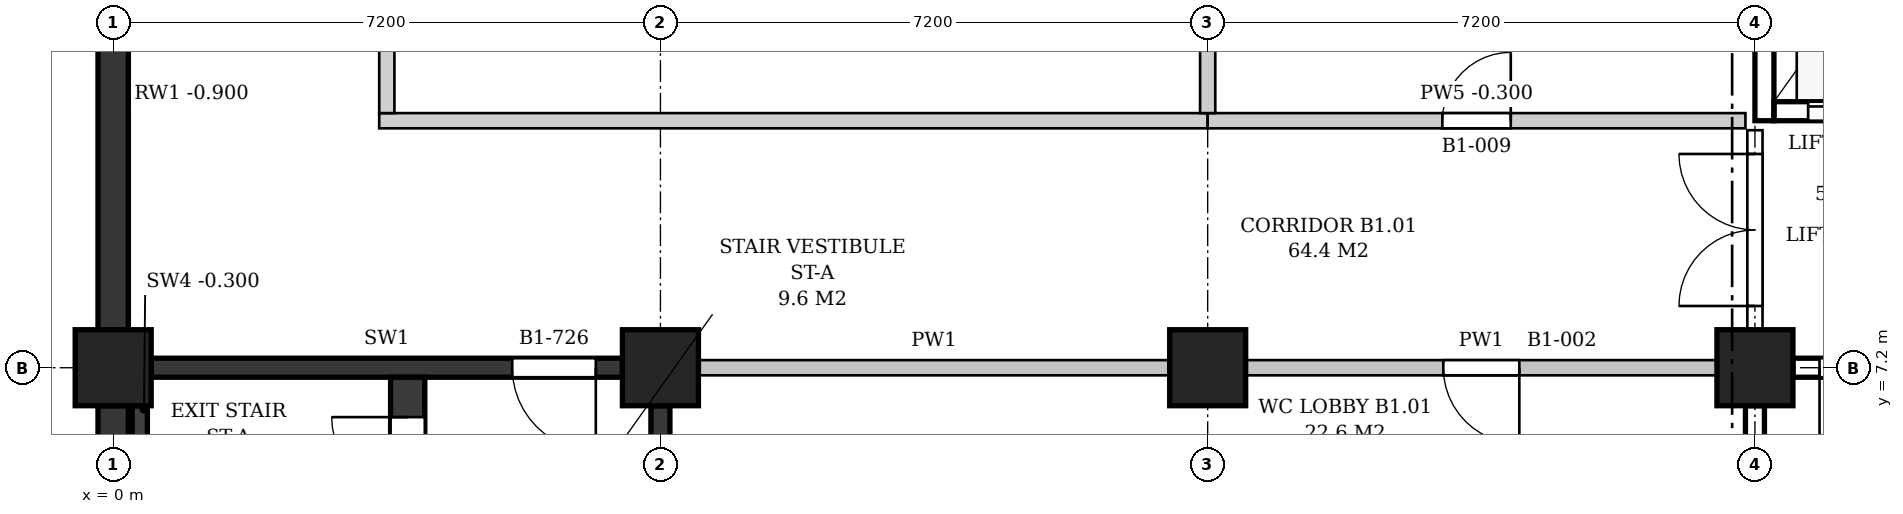
"""IFC4 building model, lengths in metres.
Left out: names, types, materials, properties, quantities, classifications, styles, units other than length and angle.
Written with IfcOpenShell. Run it as: python <this file> out.ifc"""

import sys

from ifc_helpers import new_model, si_unit, direction, frame, frame_2d, origin, origin_2d, place, context, subcontext, project, spatial, polyline, rectangle, outline, extrude, element, fill, save


model = new_model("IFC4")
c1 = context("Model", 3, precision=1e-05, world=origin(), true_north=direction((0.0, 1.0)))
c2 = subcontext(c1, "Body", "Model", "MODEL_VIEW")
j1 = project(units=[si_unit("LENGTHUNIT", "METRE"), si_unit("PLANEANGLEUNIT", "RADIAN")], contexts=[c1])
p1 = place(None, origin())
s1 = spatial("IfcSite", under=j1, at=p1, CompositionType="ELEMENT")
p2 = place(p1, origin())
s2 = spatial("IfcBuilding", under=s1, at=p2, CompositionType="ELEMENT")
p3 = place(p2, frame((0.0, 0.0, -4.5)))
s3 = spatial("IfcBuildingStorey", under=s2, at=p3, CompositionType="ELEMENT", Elevation=-4.5)
for number, where, z_axis, x_axis in (
    (1, (0.0, 7.2, 0.0), (0.0, 0.0, 1.0), (1.0, 0.0, 0.0)),
    (2, (7.2, 7.2, 0.0), (0.0, 0.0, 1.0), (1.0, 0.0, 0.0)),
    (3, (14.4, 7.2, 0.0), (0.0, 0.0, 1.0), (1.0, 0.0, 0.0)),
    (4, (21.6, 7.2, 0.0), (0.0, 0.0, 1.0), (1.0, 0.0, 0.0)),
):
    element("IfcColumn", number, at=place(p3, frame(where, z_axis=z_axis, x_axis=x_axis)), inside=s3, PredefinedType="COLUMN", context=c2, shape_type="SweptSolid", body=[
        extrude(rectangle(XDim=1.0, YDim=1.0, at=origin_2d()), origin(), (0.0, 0.0, 1.0), 4.5),
    ])
for number, where, z_axis, x_axis in (
    (5, (0.0, 13.9, 0.0), (0.0, 0.0, 1.0), (0.0, -1.0, 0.0)),
    (6, (0.0, 6.7, 0.0), (0.0, 0.0, 1.0), (0.0, -1.0, 0.0)),
):
    element("IfcWall", number, at=place(p3, frame(where, z_axis=z_axis, x_axis=x_axis)), inside=s3, PredefinedType="SOLIDWALL", context=c2, shape_type="SweptSolid", body=[
        extrude(rectangle(XDim=6.2, YDim=0.4, at=frame_2d((3.1, 0.0))), origin(), (0.0, 0.0, 1.0), 3.6),
    ])
p4 = place(p3, frame((0.5, 7.2, 0.0), z_axis=(0.0, 0.0, 1.0), x_axis=(1.0, 0.0, 0.0)))
e7 = element("IfcWall", 7, at=p4, inside=s3, PredefinedType="SHEAR", context=c2, shape_type="SweptSolid", body=[
    extrude(rectangle(XDim=6.2, YDim=0.25, at=frame_2d((3.1, 0.0))), origin(), (0.0, 0.0, 1.0), 3.4),
])
p5 = place(p4, frame((4.75, 0.0, 0.0)))
e8 = element("IfcOpeningElement", 8, at=p5, cuts=e7, PredefinedType="OPENING", context=c2, shape_type="SweptSolid", body=[
    extrude(rectangle(XDim=1.1, YDim=2.1, at=frame_2d((0.55, 1.05))), frame((0.0, 0.135, 0.0), z_axis=(0.0, -1.0, 0.0), x_axis=(1.0, 0.0, 0.0)), (0.0, 0.0, 1.0), 0.27),
])
p6 = place(p3, frame((7.2, 0.5, 0.0), z_axis=(0.0, 0.0, 1.0), x_axis=(0.0, 1.0, 0.0)))
e9 = element("IfcWall", 9, at=p6, inside=s3, PredefinedType="SHEAR", context=c2, shape_type="SweptSolid", body=[
    extrude(rectangle(XDim=6.2, YDim=0.25, at=frame_2d((3.1, 0.0))), origin(), (0.0, 0.0, 1.0), 3.4),
])
p7 = place(p3, frame((0.35, 0.5, 0.0), z_axis=(0.0, 0.0, 1.0), x_axis=(0.0, 1.0, 0.0)))
e10 = element("IfcWall", 10, at=p7, inside=s3, PredefinedType="SHEAR", context=c2, shape_type="SweptSolid", body=[
    extrude(rectangle(XDim=6.2, YDim=0.2, at=frame_2d((3.1, 0.0))), origin(), (0.0, 0.0, 1.0), 4.2),
])
p8 = place(p3, frame((3.875, 0.2, 0.0), z_axis=(0.0, 0.0, 1.0), x_axis=(0.0, 1.0, 0.0)))
e11 = element("IfcWall", 11, at=p8, inside=s3, PredefinedType="SHEAR", context=c2, shape_type="SweptSolid", body=[
    extrude(rectangle(XDim=6.875, YDim=0.45, at=frame_2d((3.438, 0.0))), origin(), (0.0, 0.0, 1.0), 4.2),
])
p9 = place(p8, frame((5.35, 0.0, 0.0)))
e12 = element("IfcOpeningElement", 12, at=p9, cuts=e11, PredefinedType="OPENING", context=c2, shape_type="SweptSolid", body=[
    extrude(rectangle(XDim=1.0, YDim=2.1, at=frame_2d((0.5, 1.05))), frame((0.0, 0.235, 0.0), z_axis=(0.0, -1.0, 0.0), x_axis=(1.0, 0.0, 0.0)), (0.0, 0.0, 1.0), 0.47),
])
p10 = place(p3, frame((22.1, 7.2, 0.0), z_axis=(0.0, 0.0, 1.0), x_axis=(1.0, 0.0, 0.0)))
e13 = element("IfcWall", 13, at=p10, inside=s3, PredefinedType="SHEAR", context=c2, shape_type="SweptSolid", body=[
    extrude(rectangle(XDim=6.2, YDim=0.25, at=frame_2d((3.1, 0.0))), origin(), (0.0, 0.0, 1.0), 3.4),
])
p11 = place(p10, frame((0.35, 0.0, 0.0)))
e14 = element("IfcOpeningElement", 14, at=p11, cuts=e13, PredefinedType="OPENING", context=c2, shape_type="SweptSolid", body=[
    extrude(rectangle(XDim=1.1, YDim=2.1, at=frame_2d((0.55, 1.05))), frame((0.0, 0.135, 0.0), z_axis=(0.0, -1.0, 0.0), x_axis=(1.0, 0.0, 0.0)), (0.0, 0.0, 1.0), 0.27),
])
p12 = place(p3, frame((21.6, 0.5, 0.0), z_axis=(0.0, 0.0, 1.0), x_axis=(0.0, 1.0, 0.0)))
e15 = element("IfcWall", 15, at=p12, inside=s3, PredefinedType="SHEAR", context=c2, shape_type="SweptSolid", body=[
    extrude(rectangle(XDim=6.2, YDim=0.25, at=frame_2d((3.1, 0.0))), origin(), (0.0, 0.0, 1.0), 3.4),
])
p13 = place(p3, frame((21.725, 10.45, -1.6), z_axis=(0.0, 0.0, 1.0), x_axis=(0.0, 1.0, 0.0)))
e16 = element("IfcWall", 16, at=p13, inside=s3, PredefinedType="SHEAR", context=c2, shape_type="SweptSolid", body=[
    extrude(rectangle(XDim=3.45, YDim=0.25, at=frame_2d((1.725, 0.0))), origin(), (0.0, 0.0, 1.0), 5.0),
])
p14 = place(p3, frame((21.85, 10.575, 0.0), z_axis=(0.0, 0.0, 1.0), x_axis=(1.0, 0.0, 0.0)))
e17 = element("IfcWall", 17, at=p14, inside=s3, PredefinedType="SHEAR", context=c2, shape_type="SweptSolid", body=[
    extrude(rectangle(XDim=2.0, YDim=0.25, at=frame_2d((1.0, 0.0))), origin(), (0.0, 0.0, 1.0), 4.2),
])
p15 = place(p14, frame((0.45, 0.0, 0.0)))
e18 = element("IfcOpeningElement", 18, at=p15, cuts=e17, PredefinedType="OPENING", context=c2, shape_type="SweptSolid", body=[
    extrude(rectangle(XDim=1.1, YDim=2.1, at=frame_2d((0.55, 1.05))), frame((0.0, 0.135, 0.0), z_axis=(0.0, -1.0, 0.0), x_axis=(1.0, 0.0, 0.0)), (0.0, 0.0, 1.0), 0.27),
])
p16 = place(p3, frame((7.7, 7.2, 0.0), z_axis=(0.0, 0.0, 1.0), x_axis=(1.0, 0.0, 0.0)))
e19 = element("IfcWall", 19, at=p16, inside=s3, PredefinedType="PARTITIONING", context=c2, shape_type="SweptSolid", body=[
    extrude(rectangle(XDim=6.2, YDim=0.2, at=frame_2d((3.1, 0.0))), origin(), (0.0, 0.0, 1.0), 3.4),
])
p17 = place(p3, frame((14.9, 7.2, 0.0), z_axis=(0.0, 0.0, 1.0), x_axis=(1.0, 0.0, 0.0)))
e20 = element("IfcWall", 20, at=p17, inside=s3, PredefinedType="PARTITIONING", context=c2, shape_type="SweptSolid", body=[
    extrude(rectangle(XDim=6.2, YDim=0.2, at=frame_2d((3.1, 0.0))), origin(), (0.0, 0.0, 1.0), 3.4),
])
p18 = place(p17, frame((2.6, 0.0, 0.0)))
e21 = element("IfcOpeningElement", 21, at=p18, cuts=e20, PredefinedType="OPENING", context=c2, shape_type="SweptSolid", body=[
    extrude(rectangle(XDim=1.0, YDim=2.1, at=frame_2d((0.5, 1.05))), frame((0.0, 0.11, 0.0), z_axis=(0.0, -1.0, 0.0), x_axis=(1.0, 0.0, 0.0)), (0.0, 0.0, 1.0), 0.22),
])
p19 = place(p3, frame((3.5, 10.45, 0.0), z_axis=(0.0, 0.0, 1.0), x_axis=(1.0, 0.0, 0.0)))
e22 = element("IfcWall", 22, at=p19, inside=s3, PredefinedType="PARTITIONING", context=c2, shape_type="SweptSolid", body=[
    extrude(outline(polyline([(0.0, 0.0), (10.9, 0.0), (10.9, 3.4), (10.6, 3.4), (10.6, 4.2), (4.0, 4.2), (4.0, 3.4), (3.4, 3.4), (3.4, 4.2), (0.0, 4.2), (0.0, 0.0)])), frame((0.0, 0.1, 0.0), z_axis=(0.0, -1.0, 0.0), x_axis=(1.0, 0.0, 0.0)), (0.0, 0.0, 1.0), 0.2),
])
p20 = place(p3, frame((14.4, 10.45, 0.0), z_axis=(0.0, 0.0, 1.0), x_axis=(1.0, 0.0, 0.0)))
e23 = element("IfcWall", 23, at=p20, inside=s3, PredefinedType="SOLIDWALL", context=c2, shape_type="SweptSolid", body=[
    extrude(outline(polyline([(0.0, 0.0), (7.075, 0.0), (7.075, 3.4), (6.9, 3.4), (6.9, 4.2), (0.3, 4.2), (0.3, 3.4), (0.0, 3.4), (0.0, 0.0)])), frame((0.0, 0.1, 0.0), z_axis=(0.0, -1.0, 0.0), x_axis=(1.0, 0.0, 0.0)), (0.0, 0.0, 1.0), 0.2),
])
p21 = place(p20, frame((3.088, 0.0, 0.0)))
e24 = element("IfcOpeningElement", 24, at=p21, cuts=e23, PredefinedType="OPENING", context=c2, shape_type="SweptSolid", body=[
    extrude(rectangle(XDim=0.9, YDim=2.1, at=frame_2d((0.45, 1.05))), frame((0.0, 0.11, 0.0), z_axis=(0.0, -1.0, 0.0), x_axis=(1.0, 0.0, 0.0)), (0.0, 0.0, 1.0), 0.22),
])
p22 = place(p3, frame((3.6, 10.55, 0.0), z_axis=(0.0, 0.0, 1.0), x_axis=(0.0, 1.0, 0.0)))
e25 = element("IfcWall", 25, at=p22, inside=s3, PredefinedType="PARTITIONING", context=c2, shape_type="SweptSolid", body=[
    extrude(outline(polyline([(0.0, 0.0), (18.15, 0.0), (18.15, 3.4), (17.95, 3.4), (17.95, 4.2), (11.35, 4.2), (11.35, 3.4), (10.75, 3.4), (10.75, 4.2), (4.15, 4.2), (4.15, 3.4), (3.55, 3.4), (3.55, 4.2), (0.0, 4.2), (0.0, 0.0)])), frame((0.0, 0.1, 0.0), z_axis=(0.0, -1.0, 0.0), x_axis=(1.0, 0.0, 0.0)), (0.0, 0.0, 1.0), 0.2),
])
p23 = place(p22, frame((8.075, 0.0, 0.0)))
e26 = element("IfcOpeningElement", 26, at=p23, cuts=e25, PredefinedType="OPENING", context=c2, shape_type="SweptSolid", body=[
    extrude(rectangle(XDim=2.0, YDim=2.1, at=frame_2d((1.0, 1.05))), frame((0.0, 0.11, 0.0), z_axis=(0.0, -1.0, 0.0), x_axis=(1.0, 0.0, 0.0)), (0.0, 0.0, 1.0), 0.22),
])
p24 = place(p22, frame((2.988, 0.0, 0.0)))
e27 = element("IfcOpeningElement", 27, at=p24, cuts=e25, PredefinedType="OPENING", context=c2, shape_type="SweptSolid", body=[
    extrude(rectangle(XDim=2.0, YDim=2.1, at=frame_2d((1.0, 1.05))), frame((0.0, 0.11, 0.0), z_axis=(0.0, -1.0, 0.0), x_axis=(1.0, 0.0, 0.0)), (0.0, 0.0, 1.0), 0.22),
])
p25 = place(p3, frame((14.4, 10.55, 0.0), z_axis=(0.0, 0.0, 1.0), x_axis=(0.0, 1.0, 0.0)))
e28 = element("IfcWall", 28, at=p25, inside=s3, PredefinedType="SOLIDWALL", context=c2, shape_type="SweptSolid", body=[
    extrude(rectangle(XDim=3.35, YDim=0.2, at=frame_2d((1.675, 0.0))), origin(), (0.0, 0.0, 1.0), 3.4),
])
p26 = place(p3, frame((21.6, 7.7, 0.0), z_axis=(0.0, 0.0, 1.0), x_axis=(0.0, 1.0, 0.0)))
e29 = element("IfcWall", 29, at=p26, inside=s3, PredefinedType="PARTITIONING", context=c2, shape_type="SweptSolid", body=[
    extrude(rectangle(XDim=2.625, YDim=0.2, at=frame_2d((1.312, 0.0))), origin(), (0.0, 0.0, 1.0), 3.4),
])
p27 = place(p26, frame((0.312, 0.0, 0.0)))
e30 = element("IfcOpeningElement", 30, at=p27, cuts=e29, PredefinedType="OPENING", context=c2, shape_type="SweptSolid", body=[
    extrude(rectangle(XDim=2.0, YDim=2.4, at=frame_2d((1.0, 1.2))), frame((0.0, 0.11, 0.0), z_axis=(0.0, -1.0, 0.0), x_axis=(1.0, 0.0, 0.0)), (0.0, 0.0, 1.0), 0.22),
])
p28 = place(p9, origin())
e31 = element("IfcDoor", 31, at=p28, inside=s3, OperationType="SINGLE_SWING_RIGHT", PredefinedType="DOOR", context=c2, shape_type="SweptSolid", body=[
    extrude(rectangle(XDim=1.0, YDim=2.1, at=frame_2d((0.5, 1.05))), frame((0.0, 0.025, 0.0), z_axis=(0.0, -1.0, 0.0), x_axis=(1.0, 0.0, 0.0)), (0.0, 0.0, 1.0), 0.05),
])
fill(e12, e31)
p29 = place(p5, frame((1.1, 0.0, 0.0), z_axis=(0.0, 0.0, 1.0), x_axis=(-1.0, 0.0, 0.0)))
e32 = element("IfcDoor", 32, at=p29, inside=s3, OperationType="SINGLE_SWING_LEFT", PredefinedType="DOOR", context=c2, shape_type="SweptSolid", body=[
    extrude(rectangle(XDim=1.1, YDim=2.1, at=frame_2d((0.55, 1.05))), frame((0.0, 0.025, 0.0), z_axis=(0.0, -1.0, 0.0), x_axis=(1.0, 0.0, 0.0)), (0.0, 0.0, 1.0), 0.05),
])
fill(e8, e32)
p30 = place(p11, frame((1.1, 0.0, 0.0), z_axis=(0.0, 0.0, 1.0), x_axis=(-1.0, 0.0, 0.0)))
e33 = element("IfcDoor", 33, at=p30, inside=s3, OperationType="SINGLE_SWING_RIGHT", PredefinedType="DOOR", context=c2, shape_type="SweptSolid", body=[
    extrude(rectangle(XDim=1.1, YDim=2.1, at=frame_2d((0.55, 1.05))), frame((0.0, 0.025, 0.0), z_axis=(0.0, -1.0, 0.0), x_axis=(1.0, 0.0, 0.0)), (0.0, 0.0, 1.0), 0.05),
])
fill(e14, e33)
p31 = place(p15, origin())
e34 = element("IfcDoor", 34, at=p31, inside=s3, OperationType="SLIDING_TO_LEFT", PredefinedType="DOOR", context=c2, shape_type="SweptSolid", body=[
    extrude(rectangle(XDim=1.1, YDim=2.1, at=frame_2d((0.55, 1.05))), frame((0.0, 0.025, 0.0), z_axis=(0.0, -1.0, 0.0), x_axis=(1.0, 0.0, 0.0)), (0.0, 0.0, 1.0), 0.05),
])
fill(e18, e34)
p32 = place(p27, origin())
e35 = element("IfcDoor", 35, at=p32, inside=s3, OperationType="DOUBLE_DOOR_SINGLE_SWING", PredefinedType="DOOR", context=c2, shape_type="SweptSolid", body=[
    extrude(rectangle(XDim=2.0, YDim=2.4, at=frame_2d((1.0, 1.2))), frame((0.0, 0.025, 0.0), z_axis=(0.0, -1.0, 0.0), x_axis=(1.0, 0.0, 0.0)), (0.0, 0.0, 1.0), 0.05),
])
fill(e30, e35)
p33 = place(p18, frame((1.0, 0.0, 0.0), z_axis=(0.0, 0.0, 1.0), x_axis=(-1.0, 0.0, 0.0)))
e36 = element("IfcDoor", 36, at=p33, inside=s3, OperationType="SINGLE_SWING_LEFT", PredefinedType="DOOR", context=c2, shape_type="SweptSolid", body=[
    extrude(rectangle(XDim=1.0, YDim=2.1, at=frame_2d((0.5, 1.05))), frame((0.0, 0.025, 0.0), z_axis=(0.0, -1.0, 0.0), x_axis=(1.0, 0.0, 0.0)), (0.0, 0.0, 1.0), 0.05),
])
fill(e21, e36)
p34 = place(p21, origin())
e37 = element("IfcDoor", 37, at=p34, inside=s3, OperationType="SINGLE_SWING_RIGHT", PredefinedType="DOOR", context=c2, shape_type="SweptSolid", body=[
    extrude(rectangle(XDim=0.9, YDim=2.1, at=frame_2d((0.45, 1.05))), frame((0.0, 0.025, 0.0), z_axis=(0.0, -1.0, 0.0), x_axis=(1.0, 0.0, 0.0)), (0.0, 0.0, 1.0), 0.05),
])
fill(e24, e37)
save(model, sys.argv[1])
